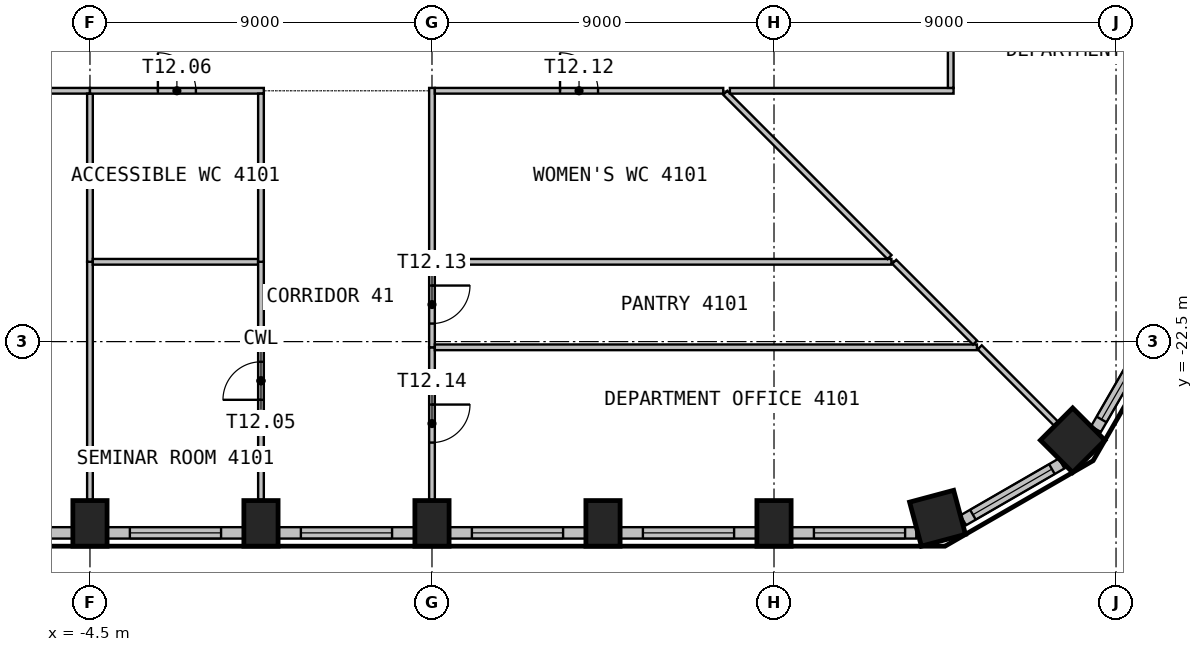
"""IFC4 building model, lengths in metres.
Left out: names, types, materials, properties, quantities, classifications, styles, units other than length and angle.
Written with IfcOpenShell. Run it as: python <this file> out.ifc"""

import sys

from ifc_helpers import new_model, si_unit, direction, frame, frame_2d, origin, origin_2d, place, context, subcontext, project, spatial, rectangle, extrude, element, fill, save


model = new_model("IFC4")
c1 = context("Model", 3, precision=1e-05, world=origin(), true_north=direction((0.0, 1.0)))
c2 = subcontext(c1, "Body", "Model", "MODEL_VIEW")
j1 = project(units=[si_unit("LENGTHUNIT", "METRE"), si_unit("PLANEANGLEUNIT", "RADIAN")], contexts=[c1])
p1 = place(None, origin())
s1 = spatial("IfcSite", under=j1, at=p1, CompositionType="ELEMENT")
p2 = place(p1, origin())
s2 = spatial("IfcBuilding", under=s1, at=p2, CompositionType="ELEMENT")
p3 = place(p2, frame((0.0, 0.0, 167.7)))
s3 = spatial("IfcBuildingStorey", under=s2, at=p3, CompositionType="ELEMENT", Elevation=167.7)
for number, where, z_axis, x_axis in (
    (1, (-4.5, -27.283, 0.0), (0.0, 0.0, 1.0), (1.0, 0.0, 0.0)),
    (2, (0.0, -27.283, 0.0), (0.0, 0.0, 1.0), (1.0, 0.0, 0.0)),
    (3, (4.5, -27.283, 0.0), (0.0, 0.0, 1.0), (1.0, 0.0, 0.0)),
    (4, (9.0, -27.283, 0.0), (0.0, 0.0, 1.0), (1.0, 0.0, 0.0)),
    (5, (13.5, -27.283, 0.0), (0.0, 0.0, 1.0), (1.0, 0.0, 0.0)),
):
    element("IfcColumn", number, at=place(p3, frame(where, z_axis=z_axis, x_axis=x_axis)), inside=s3, PredefinedType="COLUMN", context=c2, shape_type="SweptSolid", body=[
        extrude(rectangle(XDim=0.9, YDim=1.2, at=origin_2d()), origin(), (0.0, 0.0, 1.0), 3.575),
    ])
for number, where, z_axis, x_axis in (
    (6, (17.803, -27.148, 0.0), (0.0, 0.0, 1.0), (0.966, 0.259, 0.0)),
    (7, (21.359, -25.095, 0.0), (0.0, 0.0, 1.0), (0.707, 0.707, 0.0)),
):
    element("IfcColumn", number, at=place(p3, frame(where, z_axis=z_axis, x_axis=x_axis)), inside=s3, PredefinedType="COLUMN", context=c2, shape_type="SweptSolid", body=[
        extrude(rectangle(XDim=1.2, YDim=1.2, at=origin_2d()), origin(), (0.0, 0.0, 1.0), 3.575),
    ])
p4 = place(p3, frame((-8.55, -27.533, 0.0), z_axis=(0.0, 0.0, 1.0), x_axis=(1.0, 0.0, 0.0)))
e8 = element("IfcWall", 8, at=p4, inside=s3, PredefinedType="SOLIDWALL", context=c2, shape_type="SweptSolid", body=[
    extrude(rectangle(XDim=3.599, YDim=0.3, at=frame_2d((1.8, 0.0))), origin(), (0.0, 0.0, 1.0), 3.575),
])
p5 = place(p4, frame((0.6, 0.0, 0.9)))
e9 = element("IfcOpeningElement", 9, at=p5, cuts=e8, PredefinedType="OPENING", context=c2, shape_type="SweptSolid", body=[
    extrude(rectangle(XDim=2.4, YDim=2.1, at=frame_2d((1.2, 1.05))), frame((0.0, 0.16, 0.0), z_axis=(0.0, -1.0, 0.0), x_axis=(1.0, 0.0, 0.0)), (0.0, 0.0, 1.0), 0.32),
])
p6 = place(p3, frame((-4.05, -27.533, 0.0), z_axis=(0.0, 0.0, 1.0), x_axis=(1.0, 0.0, 0.0)))
e10 = element("IfcWall", 10, at=p6, inside=s3, PredefinedType="SOLIDWALL", context=c2, shape_type="SweptSolid", body=[
    extrude(rectangle(XDim=3.599, YDim=0.3, at=frame_2d((1.8, 0.0))), origin(), (0.0, 0.0, 1.0), 3.575),
])
p7 = place(p6, frame((0.6, 0.0, 0.9)))
e11 = element("IfcOpeningElement", 11, at=p7, cuts=e10, PredefinedType="OPENING", context=c2, shape_type="SweptSolid", body=[
    extrude(rectangle(XDim=2.4, YDim=2.1, at=frame_2d((1.2, 1.05))), frame((0.0, 0.16, 0.0), z_axis=(0.0, -1.0, 0.0), x_axis=(1.0, 0.0, 0.0)), (0.0, 0.0, 1.0), 0.32),
])
p8 = place(p3, frame((0.45, -27.533, 0.0), z_axis=(0.0, 0.0, 1.0), x_axis=(1.0, 0.0, 0.0)))
e12 = element("IfcWall", 12, at=p8, inside=s3, PredefinedType="SOLIDWALL", context=c2, shape_type="SweptSolid", body=[
    extrude(rectangle(XDim=3.599, YDim=0.3, at=frame_2d((1.8, 0.0))), origin(), (0.0, 0.0, 1.0), 3.575),
])
p9 = place(p8, frame((0.6, 0.0, 0.9)))
e13 = element("IfcOpeningElement", 13, at=p9, cuts=e12, PredefinedType="OPENING", context=c2, shape_type="SweptSolid", body=[
    extrude(rectangle(XDim=2.4, YDim=2.1, at=frame_2d((1.2, 1.05))), frame((0.0, 0.16, 0.0), z_axis=(0.0, -1.0, 0.0), x_axis=(1.0, 0.0, 0.0)), (0.0, 0.0, 1.0), 0.32),
])
p10 = place(p3, frame((4.95, -27.533, 0.0), z_axis=(0.0, 0.0, 1.0), x_axis=(1.0, 0.0, 0.0)))
e14 = element("IfcWall", 14, at=p10, inside=s3, PredefinedType="SOLIDWALL", context=c2, shape_type="SweptSolid", body=[
    extrude(rectangle(XDim=3.599, YDim=0.3, at=frame_2d((1.8, 0.0))), origin(), (0.0, 0.0, 1.0), 3.575),
])
p11 = place(p10, frame((0.6, 0.0, 0.9)))
e15 = element("IfcOpeningElement", 15, at=p11, cuts=e14, PredefinedType="OPENING", context=c2, shape_type="SweptSolid", body=[
    extrude(rectangle(XDim=2.4, YDim=2.1, at=frame_2d((1.2, 1.05))), frame((0.0, 0.16, 0.0), z_axis=(0.0, -1.0, 0.0), x_axis=(1.0, 0.0, 0.0)), (0.0, 0.0, 1.0), 0.32),
])
p12 = place(p3, frame((9.45, -27.533, 0.0), z_axis=(0.0, 0.0, 1.0), x_axis=(1.0, 0.0, 0.0)))
e16 = element("IfcWall", 16, at=p12, inside=s3, PredefinedType="SOLIDWALL", context=c2, shape_type="SweptSolid", body=[
    extrude(rectangle(XDim=3.599, YDim=0.3, at=frame_2d((1.8, 0.0))), origin(), (0.0, 0.0, 1.0), 3.575),
])
p13 = place(p12, frame((0.6, 0.0, 0.9)))
e17 = element("IfcOpeningElement", 17, at=p13, cuts=e16, PredefinedType="OPENING", context=c2, shape_type="SweptSolid", body=[
    extrude(rectangle(XDim=2.4, YDim=2.1, at=frame_2d((1.2, 1.05))), frame((0.0, 0.16, 0.0), z_axis=(0.0, -1.0, 0.0), x_axis=(1.0, 0.0, 0.0)), (0.0, 0.0, 1.0), 0.32),
])
p14 = place(p3, frame((13.95, -27.533, 0.0), z_axis=(0.0, 0.0, 1.0), x_axis=(1.0, 0.0, 0.0)))
e18 = element("IfcWall", 18, at=p14, inside=s3, PredefinedType="SOLIDWALL", context=c2, shape_type="SweptSolid", body=[
    extrude(rectangle(XDim=3.294, YDim=0.3, at=frame_2d((1.647, 0.0))), origin(), (0.0, 0.0, 1.0), 3.575),
])
p15 = place(p14, frame((0.6, 0.0, 0.9)))
e19 = element("IfcOpeningElement", 19, at=p15, cuts=e18, PredefinedType="OPENING", context=c2, shape_type="SweptSolid", body=[
    extrude(rectangle(XDim=2.4, YDim=2.1, at=frame_2d((1.2, 1.05))), frame((0.0, 0.16, 0.0), z_axis=(0.0, -1.0, 0.0), x_axis=(1.0, 0.0, 0.0)), (0.0, 0.0, 1.0), 0.32),
])
p16 = place(p3, frame((18.479, -27.202, 0.0), z_axis=(0.0, 0.0, 1.0), x_axis=(0.866012844897, 0.500021752, 0.0)))
e20 = element("IfcWall", 20, at=p16, inside=s3, PredefinedType="SOLIDWALL", context=c2, shape_type="SweptSolid", body=[
    extrude(rectangle(XDim=2.989, YDim=0.3, at=frame_2d((1.495, 0.0))), origin(), (0.0, 0.0, 1.0), 3.575),
])
p17 = place(p16, frame((0.295, 0.0, 0.9)))
e21 = element("IfcOpeningElement", 21, at=p17, cuts=e20, PredefinedType="OPENING", context=c2, shape_type="SweptSolid", body=[
    extrude(rectangle(XDim=2.4, YDim=2.1, at=frame_2d((1.2, 1.05))), frame((0.0, 0.16, 0.0), z_axis=(0.0, -1.0, 0.0), x_axis=(1.0, 0.0, 0.0)), (0.0, 0.0, 1.0), 0.32),
])
p18 = place(p3, frame((21.972, -24.803, 0.0), z_axis=(0.0, 0.0, 1.0), x_axis=(0.500036802197, 0.866004154983, 0.0)))
e22 = element("IfcWall", 22, at=p18, inside=s3, PredefinedType="SOLIDWALL", context=c2, shape_type="SweptSolid", body=[
    extrude(rectangle(XDim=3.294, YDim=0.3, at=frame_2d((1.647, 0.0))), origin(), (0.0, 0.0, 1.0), 3.575),
])
p19 = place(p18, frame((0.294, 0.0, 0.9)))
e23 = element("IfcOpeningElement", 23, at=p19, cuts=e22, PredefinedType="OPENING", context=c2, shape_type="SweptSolid", body=[
    extrude(rectangle(XDim=2.4, YDim=2.1, at=frame_2d((1.2, 1.05))), frame((0.0, 0.16, 0.0), z_axis=(0.0, -1.0, 0.0), x_axis=(1.0, 0.0, 0.0)), (0.0, 0.0, 1.0), 0.32),
])
p20 = place(p3, frame((-14.789, -15.9, 0.0), z_axis=(0.0, 0.0, 1.0), x_axis=(1.0, 0.0, 0.0)))
e24 = element("IfcWall", 24, at=p20, inside=s3, PredefinedType="PARTITIONING", context=c2, shape_type="SweptSolid", body=[
    extrude(rectangle(XDim=10.289, YDim=0.15, at=frame_2d((5.145, 0.0))), origin(), (0.0, 0.0, 1.0), 3.575),
])
p21 = place(p20, frame((4.645, 0.0, 0.0)))
e25 = element("IfcOpeningElement", 25, at=p21, cuts=e24, PredefinedType="OPENING", context=c2, shape_type="SweptSolid", body=[
    extrude(rectangle(XDim=1.0, YDim=2.1, at=frame_2d((0.5, 1.05))), frame((0.0, 0.085, 0.0), z_axis=(0.0, -1.0, 0.0), x_axis=(1.0, 0.0, 0.0)), (0.0, 0.0, 1.0), 0.17),
])
p22 = place(p3, frame((-4.5, -20.4, 0.0), z_axis=(0.0, 0.0, 1.0), x_axis=(0.0, -1.0, 0.0)))
e26 = element("IfcWall", 26, at=p22, inside=s3, PredefinedType="PARTITIONING", context=c2, shape_type="SweptSolid", body=[
    extrude(rectangle(XDim=6.263, YDim=0.15, at=frame_2d((3.131, 0.0))), origin(), (0.0, 0.0, 1.0), 3.575),
])
p23 = place(p3, frame((-4.5, -15.975, 0.0), z_axis=(0.0, 0.0, 1.0), x_axis=(0.0, -1.0, 0.0)))
e27 = element("IfcWall", 27, at=p23, inside=s3, PredefinedType="PARTITIONING", context=c2, shape_type="SweptSolid", body=[
    extrude(rectangle(XDim=4.425, YDim=0.15, at=frame_2d((2.212, 0.0))), origin(), (0.0, 0.0, 1.0), 3.575),
])
p24 = place(p3, frame((-4.425, -20.4, 0.0), z_axis=(0.0, 0.0, 1.0), x_axis=(1.0, 0.0, 0.0)))
e28 = element("IfcWall", 28, at=p24, inside=s3, PredefinedType="PARTITIONING", context=c2, shape_type="SweptSolid", body=[
    extrude(rectangle(XDim=4.35, YDim=0.15, at=frame_2d((2.175, 0.0))), origin(), (0.0, 0.0, 1.0), 3.575),
])
p25 = place(p3, frame((-4.5, -15.9, 0.0), z_axis=(0.0, 0.0, 1.0), x_axis=(1.0, 0.0, 0.0)))
e29 = element("IfcWall", 29, at=p25, inside=s3, PredefinedType="PARTITIONING", context=c2, shape_type="SweptSolid", body=[
    extrude(rectangle(XDim=4.575, YDim=0.15, at=frame_2d((2.288, 0.0))), origin(), (0.0, 0.0, 1.0), 3.575),
])
p26 = place(p25, frame((1.788, 0.0, 0.0)))
e30 = element("IfcOpeningElement", 30, at=p26, cuts=e29, PredefinedType="OPENING", context=c2, shape_type="SweptSolid", body=[
    extrude(rectangle(XDim=1.0, YDim=2.1, at=frame_2d((0.5, 1.05))), frame((0.0, 0.085, 0.0), z_axis=(0.0, -1.0, 0.0), x_axis=(1.0, 0.0, 0.0)), (0.0, 0.0, 1.0), 0.17),
])
p27 = place(p3, frame((0.0, -26.663, 0.0), z_axis=(0.0, 0.0, 1.0), x_axis=(0.0, 1.0, 0.0)))
e31 = element("IfcWall", 31, at=p27, inside=s3, PredefinedType="PARTITIONING", context=c2, shape_type="SweptSolid", body=[
    extrude(rectangle(XDim=6.263, YDim=0.15, at=frame_2d((3.131, 0.0))), origin(), (0.0, 0.0, 1.0), 3.575),
])
p28 = place(p27, frame((2.631, 0.0, 0.0)))
e32 = element("IfcOpeningElement", 32, at=p28, cuts=e31, PredefinedType="OPENING", context=c2, shape_type="SweptSolid", body=[
    extrude(rectangle(XDim=1.0, YDim=2.1, at=frame_2d((0.5, 1.05))), frame((0.0, 0.085, 0.0), z_axis=(0.0, -1.0, 0.0), x_axis=(1.0, 0.0, 0.0)), (0.0, 0.0, 1.0), 0.17),
])
p29 = place(p3, frame((0.0, -20.4, 0.0), z_axis=(0.0, 0.0, 1.0), x_axis=(0.0, 1.0, 0.0)))
e33 = element("IfcWall", 33, at=p29, inside=s3, PredefinedType="PARTITIONING", context=c2, shape_type="SweptSolid", body=[
    extrude(rectangle(XDim=4.425, YDim=0.15, at=frame_2d((2.212, 0.0))), origin(), (0.0, 0.0, 1.0), 3.575),
])
p30 = place(p3, frame((4.5, -22.65, 0.0), z_axis=(0.0, 0.0, 1.0), x_axis=(0.0, -1.0, 0.0)))
e34 = element("IfcWall", 34, at=p30, inside=s3, PredefinedType="PARTITIONING", context=c2, shape_type="SweptSolid", body=[
    extrude(rectangle(XDim=4.013, YDim=0.15, at=frame_2d((2.006, 0.0))), origin(), (0.0, 0.0, 1.0), 3.575),
])
p31 = place(p30, frame((1.506, 0.0, 0.0)))
e35 = element("IfcOpeningElement", 35, at=p31, cuts=e34, PredefinedType="OPENING", context=c2, shape_type="SweptSolid", body=[
    extrude(rectangle(XDim=1.0, YDim=2.1, at=frame_2d((0.5, 1.05))), frame((0.0, 0.085, 0.0), z_axis=(0.0, -1.0, 0.0), x_axis=(1.0, 0.0, 0.0)), (0.0, 0.0, 1.0), 0.17),
])
p32 = place(p3, frame((4.5, -20.4, 0.0), z_axis=(0.0, 0.0, 1.0), x_axis=(0.0, -1.0, 0.0)))
e36 = element("IfcWall", 36, at=p32, inside=s3, PredefinedType="PARTITIONING", context=c2, shape_type="SweptSolid", body=[
    extrude(rectangle(XDim=2.25, YDim=0.15, at=frame_2d((1.125, 0.0))), origin(), (0.0, 0.0, 1.0), 3.575),
])
p33 = place(p32, frame((0.625, 0.0, 0.0)))
e37 = element("IfcOpeningElement", 37, at=p33, cuts=e36, PredefinedType="OPENING", context=c2, shape_type="SweptSolid", body=[
    extrude(rectangle(XDim=1.0, YDim=2.1, at=frame_2d((0.5, 1.05))), frame((0.0, 0.085, 0.0), z_axis=(0.0, -1.0, 0.0), x_axis=(1.0, 0.0, 0.0)), (0.0, 0.0, 1.0), 0.17),
])
p34 = place(p3, frame((18.839, -22.65, 0.0), z_axis=(0.0, 0.0, 1.0), x_axis=(-1.0, 0.0, 0.0)))
e38 = element("IfcWall", 38, at=p34, inside=s3, PredefinedType="PARTITIONING", context=c2, shape_type="SweptSolid", body=[
    extrude(rectangle(XDim=14.264, YDim=0.15, at=frame_2d((7.132, 0.0))), origin(), (0.0, 0.0, 1.0), 3.575),
])
p35 = place(p3, frame((4.5, -15.825, 0.0), z_axis=(0.0, 0.0, 1.0), x_axis=(0.0, -1.0, 0.0)))
e39 = element("IfcWall", 39, at=p35, inside=s3, PredefinedType="PARTITIONING", context=c2, shape_type="SweptSolid", body=[
    extrude(rectangle(XDim=4.575, YDim=0.15, at=frame_2d((2.288, 0.0))), origin(), (0.0, 0.0, 1.0), 3.575),
])
p36 = place(p3, frame((16.589, -20.4, 0.0), z_axis=(0.0, 0.0, 1.0), x_axis=(-1.0, 0.0, 0.0)))
e40 = element("IfcWall", 40, at=p36, inside=s3, PredefinedType="PARTITIONING", context=c2, shape_type="SweptSolid", body=[
    extrude(rectangle(XDim=12.014, YDim=0.15, at=frame_2d((6.007, 0.0))), origin(), (0.0, 0.0, 1.0), 3.575),
])
p37 = place(p3, frame((4.575, -15.9, 0.0), z_axis=(0.0, 0.0, 1.0), x_axis=(1.0, 0.0, 0.0)))
e41 = element("IfcWall", 41, at=p37, inside=s3, PredefinedType="PARTITIONING", context=c2, shape_type="SweptSolid", body=[
    extrude(rectangle(XDim=7.589, YDim=0.15, at=frame_2d((3.794, 0.0))), origin(), (0.0, 0.0, 1.0), 3.575),
])
p38 = place(p37, frame((3.294, 0.0, 0.0)))
e42 = element("IfcOpeningElement", 42, at=p38, cuts=e41, PredefinedType="OPENING", context=c2, shape_type="SweptSolid", body=[
    extrude(rectangle(XDim=1.0, YDim=2.1, at=frame_2d((0.5, 1.05))), frame((0.0, 0.085, 0.0), z_axis=(0.0, -1.0, 0.0), x_axis=(1.0, 0.0, 0.0)), (0.0, 0.0, 1.0), 0.17),
])
p39 = place(p3, frame((12.217, -15.953, 0.0), z_axis=(0.0, 0.0, 1.0), x_axis=(0.707086815725, -0.707126746085, 0.0)))
e43 = element("IfcWall", 43, at=p39, inside=s3, PredefinedType="PARTITIONING", context=c2, shape_type="SweptSolid", body=[
    extrude(rectangle(XDim=6.114, YDim=0.15, at=frame_2d((3.057, 0.0))), origin(), (0.0, 0.0, 1.0), 3.575),
])
p40 = place(p3, frame((12.339, -15.9, 0.0), z_axis=(0.0, 0.0, 1.0), x_axis=(1.0, 0.0, 0.0)))
e44 = element("IfcWall", 44, at=p40, inside=s3, PredefinedType="PARTITIONING", context=c2, shape_type="SweptSolid", body=[
    extrude(rectangle(XDim=5.886, YDim=0.15, at=frame_2d((2.943, 0.0))), origin(), (0.0, 0.0, 1.0), 3.575),
])
p41 = place(p3, frame((16.664, -20.4, 0.0), z_axis=(0.0, 0.0, 1.0), x_axis=(0.707066186027, -0.707147374015, 0.0)))
e45 = element("IfcWall", 45, at=p41, inside=s3, PredefinedType="PARTITIONING", context=c2, shape_type="SweptSolid", body=[
    extrude(rectangle(XDim=3.007, YDim=0.15, at=frame_2d((1.503, 0.0))), origin(), (0.0, 0.0, 1.0), 3.575),
])
p42 = place(p3, frame((18.15, -15.825, 0.0), z_axis=(0.0, 0.0, 1.0), x_axis=(0.0, 1.0, 0.0)))
e46 = element("IfcWall", 46, at=p42, inside=s3, PredefinedType="PARTITIONING", context=c2, shape_type="SweptSolid", body=[
    extrude(rectangle(XDim=13.65, YDim=0.15, at=frame_2d((6.825, 0.0))), origin(), (0.0, 0.0, 1.0), 3.575),
])
p43 = place(p3, frame((18.914, -22.65, 0.0), z_axis=(0.0, 0.0, 1.0), x_axis=(0.707063760666, -0.707149799089, 0.0)))
e47 = element("IfcWall", 47, at=p43, inside=s3, PredefinedType="PARTITIONING", context=c2, shape_type="SweptSolid", body=[
    extrude(rectangle(XDim=2.838, YDim=0.15, at=frame_2d((1.419, 0.0))), origin(), (0.0, 0.0, 1.0), 3.575),
])
p44 = place(p7, origin())
e48 = element("IfcWindow", 48, at=p44, inside=s3, PartitioningType="SINGLE_PANEL", PredefinedType="WINDOW", context=c2, shape_type="SweptSolid", body=[
    extrude(rectangle(XDim=2.4, YDim=2.1, at=frame_2d((1.2, 1.05))), frame((0.0, 0.03, 0.0), z_axis=(0.0, -1.0, 0.0), x_axis=(1.0, 0.0, 0.0)), (0.0, 0.0, 1.0), 0.06),
])
fill(e11, e48)
p45 = place(p9, origin())
e49 = element("IfcWindow", 49, at=p45, inside=s3, PartitioningType="SINGLE_PANEL", PredefinedType="WINDOW", context=c2, shape_type="SweptSolid", body=[
    extrude(rectangle(XDim=2.4, YDim=2.1, at=frame_2d((1.2, 1.05))), frame((0.0, 0.03, 0.0), z_axis=(0.0, -1.0, 0.0), x_axis=(1.0, 0.0, 0.0)), (0.0, 0.0, 1.0), 0.06),
])
fill(e13, e49)
p46 = place(p11, origin())
e50 = element("IfcWindow", 50, at=p46, inside=s3, PartitioningType="SINGLE_PANEL", PredefinedType="WINDOW", context=c2, shape_type="SweptSolid", body=[
    extrude(rectangle(XDim=2.4, YDim=2.1, at=frame_2d((1.2, 1.05))), frame((0.0, 0.03, 0.0), z_axis=(0.0, -1.0, 0.0), x_axis=(1.0, 0.0, 0.0)), (0.0, 0.0, 1.0), 0.06),
])
fill(e15, e50)
p47 = place(p13, origin())
e51 = element("IfcWindow", 51, at=p47, inside=s3, PartitioningType="SINGLE_PANEL", PredefinedType="WINDOW", context=c2, shape_type="SweptSolid", body=[
    extrude(rectangle(XDim=2.4, YDim=2.1, at=frame_2d((1.2, 1.05))), frame((0.0, 0.03, 0.0), z_axis=(0.0, -1.0, 0.0), x_axis=(1.0, 0.0, 0.0)), (0.0, 0.0, 1.0), 0.06),
])
fill(e17, e51)
p48 = place(p15, origin())
e52 = element("IfcWindow", 52, at=p48, inside=s3, PartitioningType="SINGLE_PANEL", PredefinedType="WINDOW", context=c2, shape_type="SweptSolid", body=[
    extrude(rectangle(XDim=2.4, YDim=2.1, at=frame_2d((1.2, 1.05))), frame((0.0, 0.03, 0.0), z_axis=(0.0, -1.0, 0.0), x_axis=(1.0, 0.0, 0.0)), (0.0, 0.0, 1.0), 0.06),
])
fill(e19, e52)
p49 = place(p17, origin())
e53 = element("IfcWindow", 53, at=p49, inside=s3, PartitioningType="SINGLE_PANEL", PredefinedType="WINDOW", context=c2, shape_type="SweptSolid", body=[
    extrude(rectangle(XDim=2.4, YDim=2.1, at=frame_2d((1.2, 1.05))), frame((0.0, 0.03, 0.0), z_axis=(0.0, -1.0, 0.0), x_axis=(1.0, 0.0, 0.0)), (0.0, 0.0, 1.0), 0.06),
])
fill(e21, e53)
p50 = place(p19, origin())
e54 = element("IfcWindow", 54, at=p50, inside=s3, PartitioningType="SINGLE_PANEL", PredefinedType="WINDOW", context=c2, shape_type="SweptSolid", body=[
    extrude(rectangle(XDim=2.4, YDim=2.1, at=frame_2d((1.2, 1.05))), frame((0.0, 0.03, 0.0), z_axis=(0.0, -1.0, 0.0), x_axis=(1.0, 0.0, 0.0)), (0.0, 0.0, 1.0), 0.06),
])
fill(e23, e54)
p51 = place(p28, origin())
e55 = element("IfcDoor", 55, at=p51, inside=s3, OperationType="SINGLE_SWING_RIGHT", PredefinedType="DOOR", context=c2, shape_type="SweptSolid", body=[
    extrude(rectangle(XDim=1.0, YDim=2.1, at=frame_2d((0.5, 1.05))), frame((0.0, 0.025, 0.0), z_axis=(0.0, -1.0, 0.0), x_axis=(1.0, 0.0, 0.0)), (0.0, 0.0, 1.0), 0.05),
])
fill(e32, e55)
p52 = place(p26, origin())
e56 = element("IfcDoor", 56, at=p52, inside=s3, OperationType="SINGLE_SWING_LEFT", PredefinedType="DOOR", context=c2, shape_type="SweptSolid", body=[
    extrude(rectangle(XDim=1.0, YDim=2.1, at=frame_2d((0.5, 1.05))), frame((0.0, 0.025, 0.0), z_axis=(0.0, -1.0, 0.0), x_axis=(1.0, 0.0, 0.0)), (0.0, 0.0, 1.0), 0.05),
])
fill(e30, e56)
p53 = place(p38, origin())
e57 = element("IfcDoor", 57, at=p53, inside=s3, OperationType="SINGLE_SWING_RIGHT", PredefinedType="DOOR", context=c2, shape_type="SweptSolid", body=[
    extrude(rectangle(XDim=1.0, YDim=2.1, at=frame_2d((0.5, 1.05))), frame((0.0, 0.025, 0.0), z_axis=(0.0, -1.0, 0.0), x_axis=(1.0, 0.0, 0.0)), (0.0, 0.0, 1.0), 0.05),
])
fill(e42, e57)
p54 = place(p33, origin())
e58 = element("IfcDoor", 58, at=p54, inside=s3, OperationType="SINGLE_SWING_RIGHT", PredefinedType="DOOR", context=c2, shape_type="SweptSolid", body=[
    extrude(rectangle(XDim=1.0, YDim=2.1, at=frame_2d((0.5, 1.05))), frame((0.0, 0.025, 0.0), z_axis=(0.0, -1.0, 0.0), x_axis=(1.0, 0.0, 0.0)), (0.0, 0.0, 1.0), 0.05),
])
fill(e37, e58)
p55 = place(p31, origin())
e59 = element("IfcDoor", 59, at=p55, inside=s3, OperationType="SINGLE_SWING_LEFT", PredefinedType="DOOR", context=c2, shape_type="SweptSolid", body=[
    extrude(rectangle(XDim=1.0, YDim=2.1, at=frame_2d((0.5, 1.05))), frame((0.0, 0.025, 0.0), z_axis=(0.0, -1.0, 0.0), x_axis=(1.0, 0.0, 0.0)), (0.0, 0.0, 1.0), 0.05),
])
fill(e35, e59)
save(model, sys.argv[1])
